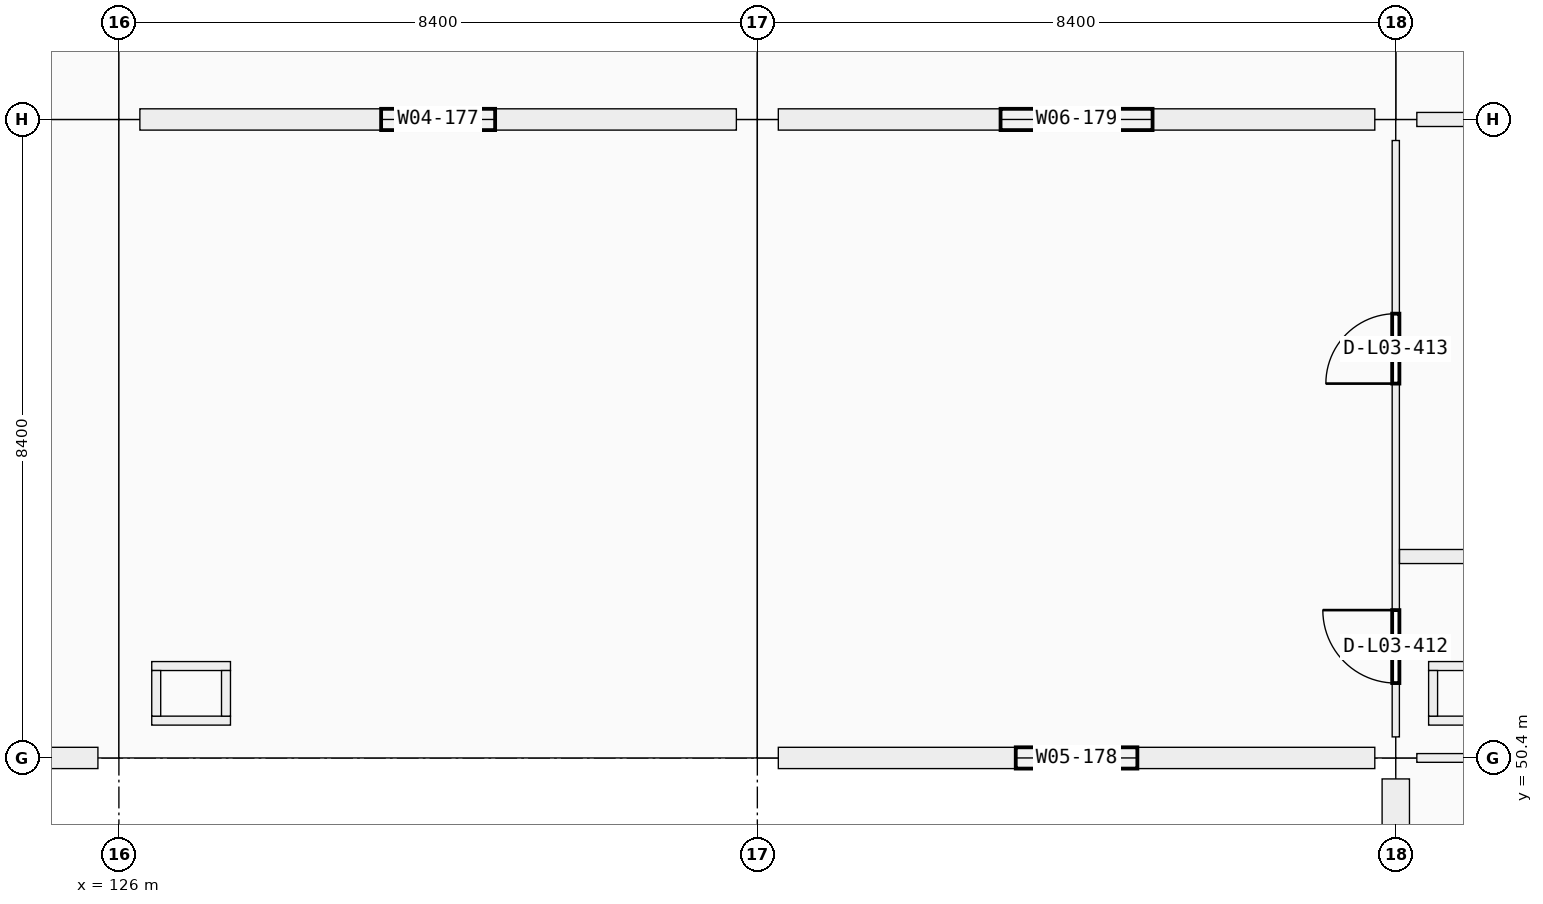
"""IFC4 building model, lengths in metres.
Left out: names, types, materials, properties, quantities, classifications, styles, units other than length and angle.
Written with IfcOpenShell. Run it as: python <this file> out.ifc"""

import sys

from ifc_helpers import new_model, si_unit, direction, frame, frame_2d, origin, origin_2d, place, context, subcontext, project, spatial, rectangle, i_section, extrude, element, fill, save


model = new_model("IFC4")
c1 = context("Model", 3, precision=1e-05, world=origin(), true_north=direction((0.0, 1.0)))
c2 = subcontext(c1, "Body", "Model", "MODEL_VIEW")
j1 = project(units=[si_unit("LENGTHUNIT", "METRE"), si_unit("PLANEANGLEUNIT", "RADIAN")], contexts=[c1])
p1 = place(None, origin())
s1 = spatial("IfcSite", under=j1, at=p1, CompositionType="ELEMENT")
p2 = place(p1, origin())
s2 = spatial("IfcBuilding", under=s1, at=p2, CompositionType="ELEMENT")
p3 = place(p2, frame((0.0, 0.0, 14.76)))
s3 = spatial("IfcBuildingStorey", under=s2, at=p3, CompositionType="ELEMENT", Elevation=14.76)
for number, where, z_axis, x_axis in (
    (1, (126.0, 50.4, 0.0), (0.0, 0.0, 1.0), (1.0, 0.0, 0.0)),
    (2, (126.0, 58.8, 0.0), (0.0, 0.0, 1.0), (1.0, 0.0, 0.0)),
    (3, (134.4, 50.4, 0.0), (0.0, 0.0, 1.0), (1.0, 0.0, 0.0)),
    (4, (134.4, 58.8, 0.0), (0.0, 0.0, 1.0), (1.0, 0.0, 0.0)),
):
    element("IfcColumn", number, at=place(p3, frame(where, z_axis=z_axis, x_axis=x_axis)), inside=s3, PredefinedType="COLUMN", context=c2, shape_type="SweptSolid", body=[
        extrude(rectangle(XDim=0.55, YDim=0.55, at=origin_2d()), origin(), (0.0, 0.0, 1.0), 4.07),
    ])
for number, where, z_axis, x_axis in (
    (5, (142.8, 50.4, 0.0), (0.0, 0.0, 1.0), (1.0, 0.0, 0.0)),
    (6, (142.8, 58.8, 0.0), (0.0, 0.0, 1.0), (1.0, 0.0, 0.0)),
):
    element("IfcColumn", number, at=place(p3, frame(where, z_axis=z_axis, x_axis=x_axis)), inside=s3, PredefinedType="COLUMN", context=c2, shape_type="SweptSolid", body=[
        extrude(rectangle(XDim=0.55, YDim=0.55, at=origin_2d()), origin(), (0.0, 0.0, 1.0), 4.17),
    ])
for number, where, z_axis, x_axis in (
    (7, (142.94, 50.4, 4.17), (0.0, 0.0, 1.0), (1.0, 0.0, 0.0)),
    (8, (142.94, 58.8, 4.17), (0.0, 0.0, 1.0), (1.0, 0.0, 0.0)),
):
    element("IfcColumn", number, at=place(p3, frame(where, z_axis=z_axis, x_axis=x_axis)), inside=s3, PredefinedType="COLUMN", context=c2, shape_type="SweptSolid", body=[
        extrude(i_section(OverallWidth=0.254, OverallDepth=0.254, WebThickness=0.009, FlangeThickness=0.014, FilletRadius=0.013, at=origin_2d()), origin(), (0.0, 0.0, 1.0), 2.157),
    ])
p4 = place(p3, frame((125.724, 50.4, 0.0), z_axis=(0.0, 0.0, 1.0), x_axis=(-1.0, 0.0, 0.0)))
e9 = element("IfcWall", 9, at=p4, inside=s3, PredefinedType="SOLIDWALL", context=c2, shape_type="SweptSolid", body=[
    extrude(rectangle(XDim=7.848, YDim=0.28, at=frame_2d((3.924, 0.0))), origin(), (0.0, 0.0, 1.0), 3.37),
])
p5 = place(p4, frame((3.024, 0.0, 0.9)))
e10 = element("IfcOpeningElement", 10, at=p5, cuts=e9, PredefinedType="OPENING", context=c2, shape_type="SweptSolid", body=[
    extrude(rectangle(XDim=1.8, YDim=1.8, at=frame_2d((0.9, 0.9))), frame((0.0, 0.14, 0.0), z_axis=(0.0, -1.0, 0.0), x_axis=(1.0, 0.0, 0.0)), (0.0, 0.0, 1.0), 0.28),
])
p6 = place(p3, frame((126.276, 58.8, 0.0), z_axis=(0.0, 0.0, 1.0), x_axis=(1.0, 0.0, 0.0)))
e11 = element("IfcWall", 11, at=p6, inside=s3, PredefinedType="SOLIDWALL", context=c2, shape_type="SweptSolid", body=[
    extrude(rectangle(XDim=7.848, YDim=0.28, at=frame_2d((3.924, 0.0))), origin(), (0.0, 0.0, 1.0), 3.37),
])
p7 = place(p6, frame((3.174, 0.0, 0.9)))
e12 = element("IfcOpeningElement", 12, at=p7, cuts=e11, PredefinedType="OPENING", context=c2, shape_type="SweptSolid", body=[
    extrude(rectangle(XDim=1.5, YDim=1.8, at=frame_2d((0.75, 0.9))), frame((0.0, 0.14, 0.0), z_axis=(0.0, -1.0, 0.0), x_axis=(1.0, 0.0, 0.0)), (0.0, 0.0, 1.0), 0.28),
])
p8 = place(p3, frame((142.524, 50.4, 0.0), z_axis=(0.0, 0.0, 1.0), x_axis=(-1.0, 0.0, 0.0)))
e13 = element("IfcWall", 13, at=p8, inside=s3, PredefinedType="SOLIDWALL", context=c2, shape_type="SweptSolid", body=[
    extrude(rectangle(XDim=7.848, YDim=0.28, at=frame_2d((3.924, 0.0))), origin(), (0.0, 0.0, 1.0), 3.37),
])
p9 = place(p8, frame((3.124, 0.0, 0.9)))
e14 = element("IfcOpeningElement", 14, at=p9, cuts=e13, PredefinedType="OPENING", context=c2, shape_type="SweptSolid", body=[
    extrude(rectangle(XDim=1.6, YDim=2.1, at=frame_2d((0.8, 1.05))), frame((0.0, 0.14, 0.0), z_axis=(0.0, -1.0, 0.0), x_axis=(1.0, 0.0, 0.0)), (0.0, 0.0, 1.0), 0.28),
])
p10 = place(p3, frame((134.676, 58.8, 0.0), z_axis=(0.0, 0.0, 1.0), x_axis=(1.0, 0.0, 0.0)))
e15 = element("IfcWall", 15, at=p10, inside=s3, PredefinedType="SOLIDWALL", context=c2, shape_type="SweptSolid", body=[
    extrude(rectangle(XDim=7.848, YDim=0.28, at=frame_2d((3.924, 0.0))), origin(), (0.0, 0.0, 1.0), 3.37),
])
p11 = place(p10, frame((2.924, 0.0, 0.9)))
e16 = element("IfcOpeningElement", 16, at=p11, cuts=e15, PredefinedType="OPENING", context=c2, shape_type="SweptSolid", body=[
    extrude(rectangle(XDim=2.0, YDim=2.1, at=frame_2d((1.0, 1.05))), frame((0.0, 0.14, 0.0), z_axis=(0.0, -1.0, 0.0), x_axis=(1.0, 0.0, 0.0)), (0.0, 0.0, 1.0), 0.28),
])
p12 = place(p3, frame((142.8, 42.276, 0.0), z_axis=(0.0, 0.0, 1.0), x_axis=(0.0, 1.0, 0.0)))
e17 = element("IfcWall", 17, at=p12, inside=s3, PredefinedType="SOLIDWALL", context=c2, shape_type="SweptSolid", body=[
    extrude(rectangle(XDim=7.848, YDim=0.36, at=frame_2d((3.924, 0.0))), origin(), (0.0, 0.0, 1.0), 3.37),
])
p13 = place(p12, frame((2.824, 0.0, 0.9)))
e18 = element("IfcOpeningElement", 18, at=p13, cuts=e17, PredefinedType="OPENING", context=c2, shape_type="SweptSolid", body=[
    extrude(rectangle(XDim=2.2, YDim=1.35, at=frame_2d((1.1, 0.675))), frame((0.0, 0.18, 0.0), z_axis=(0.0, -1.0, 0.0), x_axis=(1.0, 0.0, 0.0)), (0.0, 0.0, 1.0), 0.36),
])
for number, where, z_axis, x_axis in (
    (19, (126.432, 50.891, 0.0), (0.0, 0.0, 1.0), (1.0, 0.0, 0.0)),
    (20, (126.432, 51.609, 0.0), (0.0, 0.0, 1.0), (1.0, 0.0, 0.0)),
):
    element("IfcWall", number, at=place(p3, frame(where, z_axis=z_axis, x_axis=x_axis)), inside=s3, PredefinedType="PARTITIONING", context=c2, shape_type="SweptSolid", body=[
        extrude(rectangle(XDim=1.036, YDim=0.118, at=frame_2d((0.518, 0.0))), origin(), (0.0, 0.0, 1.0), 3.35),
    ])
for number, where, z_axis, x_axis in (
    (21, (126.491, 50.95, 0.0), (0.0, 0.0, 1.0), (0.0, 1.0, 0.0)),
    (22, (127.409, 50.95, 0.0), (0.0, 0.0, 1.0), (0.0, 1.0, 0.0)),
):
    element("IfcWall", number, at=place(p3, frame(where, z_axis=z_axis, x_axis=x_axis)), inside=s3, PredefinedType="PARTITIONING", context=c2, shape_type="SweptSolid", body=[
        extrude(rectangle(XDim=0.6, YDim=0.118, at=frame_2d((0.3, 0.0))), origin(), (0.0, 0.0, 1.0), 3.35),
    ])
for number, where, z_axis, x_axis in (
    (23, (143.232, 50.891, 0.0), (0.0, 0.0, 1.0), (1.0, 0.0, 0.0)),
    (24, (143.232, 51.609, 0.0), (0.0, 0.0, 1.0), (1.0, 0.0, 0.0)),
):
    element("IfcWall", number, at=place(p3, frame(where, z_axis=z_axis, x_axis=x_axis)), inside=s3, PredefinedType="PARTITIONING", context=c2, shape_type="SweptSolid", body=[
        extrude(rectangle(XDim=1.036, YDim=0.118, at=frame_2d((0.518, 0.0))), origin(), (0.0, 0.0, 1.0), 3.35),
    ])
p14 = place(p3, frame((143.291, 50.95, 0.0), z_axis=(0.0, 0.0, 1.0), x_axis=(0.0, 1.0, 0.0)))
e25 = element("IfcWall", 25, at=p14, inside=s3, PredefinedType="PARTITIONING", context=c2, shape_type="SweptSolid", body=[
    extrude(rectangle(XDim=0.6, YDim=0.118, at=frame_2d((0.3, 0.0))), origin(), (0.0, 0.0, 1.0), 3.35),
])
p15 = place(p3, frame((143.077, 50.4, 0.0), z_axis=(0.0, 0.0, 1.0), x_axis=(1.0, 0.0, 0.0)))
e26 = element("IfcWall", 26, at=p15, inside=s3, PredefinedType="PARTITIONING", context=c2, shape_type="SweptSolid", body=[
    extrude(rectangle(XDim=7.846, YDim=0.115, at=frame_2d((3.923, 0.0))), origin(), (0.0, 0.0, 1.0), 3.19),
])
p16 = place(p3, frame((143.077, 58.8, 0.0), z_axis=(0.0, 0.0, 1.0), x_axis=(1.0, 0.0, 0.0)))
e27 = element("IfcWall", 27, at=p16, inside=s3, PredefinedType="PARTITIONING", context=c2, shape_type="SweptSolid", body=[
    extrude(rectangle(XDim=7.846, YDim=0.185, at=frame_2d((3.923, 0.0))), origin(), (0.0, 0.0, 1.0), 3.19),
])
p17 = place(p3, frame((142.8, 50.677, 0.0), z_axis=(0.0, 0.0, 1.0), x_axis=(0.0, 1.0, 0.0)))
e28 = element("IfcWall", 28, at=p17, inside=s3, PredefinedType="PARTITIONING", context=c2, shape_type="SweptSolid", body=[
    extrude(rectangle(XDim=7.846, YDim=0.095, at=frame_2d((3.923, 0.0))), origin(), (0.0, 0.0, 1.0), 3.19),
])
p18 = place(p17, frame((0.708, 0.0, 0.0)))
e29 = element("IfcOpeningElement", 29, at=p18, cuts=e28, PredefinedType="OPENING", context=c2, shape_type="SweptSolid", body=[
    extrude(rectangle(XDim=0.96, YDim=2.1, at=frame_2d((0.48, 1.05))), frame((0.0, 0.047, 0.0), z_axis=(0.0, -1.0, 0.0), x_axis=(1.0, 0.0, 0.0)), (0.0, 0.0, 1.0), 0.095),
])
p19 = place(p17, frame((4.648, 0.0, 0.0)))
e30 = element("IfcOpeningElement", 30, at=p19, cuts=e28, PredefinedType="OPENING", context=c2, shape_type="SweptSolid", body=[
    extrude(rectangle(XDim=0.92, YDim=2.1, at=frame_2d((0.46, 1.05))), frame((0.0, 0.047, 0.0), z_axis=(0.0, -1.0, 0.0), x_axis=(1.0, 0.0, 0.0)), (0.0, 0.0, 1.0), 0.095),
])
p20 = place(p3, frame((142.85, 53.05, 0.0), z_axis=(0.0, 0.0, 1.0), x_axis=(1.0, 0.0, 0.0)))
e31 = element("IfcWall", 31, at=p20, inside=s3, PredefinedType="PARTITIONING", context=c2, shape_type="SweptSolid", body=[
    extrude(rectangle(XDim=8.256, YDim=0.185, at=frame_2d((4.128, 0.0))), origin(), (0.0, 0.0, 1.0), 3.19),
])
p21 = place(p7, origin())
e32 = element("IfcWindow", 32, at=p21, inside=s3, PartitioningType="SINGLE_PANEL", PredefinedType="WINDOW", context=c2, shape_type="SweptSolid", body=[
    extrude(rectangle(XDim=1.5, YDim=1.8, at=frame_2d((0.75, 0.9))), frame((0.0, 0.03, 0.0), z_axis=(0.0, -1.0, 0.0), x_axis=(1.0, 0.0, 0.0)), (0.0, 0.0, 1.0), 0.06),
])
fill(e12, e32)
p22 = place(p9, origin())
e33 = element("IfcWindow", 33, at=p22, inside=s3, PartitioningType="SINGLE_PANEL", PredefinedType="WINDOW", context=c2, shape_type="SweptSolid", body=[
    extrude(rectangle(XDim=1.6, YDim=2.1, at=frame_2d((0.8, 1.05))), frame((0.0, 0.03, 0.0), z_axis=(0.0, -1.0, 0.0), x_axis=(1.0, 0.0, 0.0)), (0.0, 0.0, 1.0), 0.06),
])
fill(e14, e33)
p23 = place(p11, origin())
e34 = element("IfcWindow", 34, at=p23, inside=s3, PartitioningType="SINGLE_PANEL", PredefinedType="WINDOW", context=c2, shape_type="SweptSolid", body=[
    extrude(rectangle(XDim=2.0, YDim=2.1, at=frame_2d((1.0, 1.05))), frame((0.0, 0.03, 0.0), z_axis=(0.0, -1.0, 0.0), x_axis=(1.0, 0.0, 0.0)), (0.0, 0.0, 1.0), 0.06),
])
fill(e16, e34)
p24 = place(p18, origin())
e35 = element("IfcDoor", 35, at=p24, inside=s3, OperationType="SINGLE_SWING_RIGHT", PredefinedType="DOOR", context=c2, shape_type="SweptSolid", body=[
    extrude(rectangle(XDim=0.96, YDim=2.1, at=frame_2d((0.48, 1.05))), frame((0.0, 0.025, 0.0), z_axis=(0.0, -1.0, 0.0), x_axis=(1.0, 0.0, 0.0)), (0.0, 0.0, 1.0), 0.05),
])
fill(e29, e35)
p25 = place(p19, origin())
e36 = element("IfcDoor", 36, at=p25, inside=s3, OperationType="SINGLE_SWING_LEFT", PredefinedType="DOOR", context=c2, shape_type="SweptSolid", body=[
    extrude(rectangle(XDim=0.92, YDim=2.1, at=frame_2d((0.46, 1.05))), frame((0.0, 0.025, 0.0), z_axis=(0.0, -1.0, 0.0), x_axis=(1.0, 0.0, 0.0)), (0.0, 0.0, 1.0), 0.05),
])
fill(e30, e36)
save(model, sys.argv[1])
